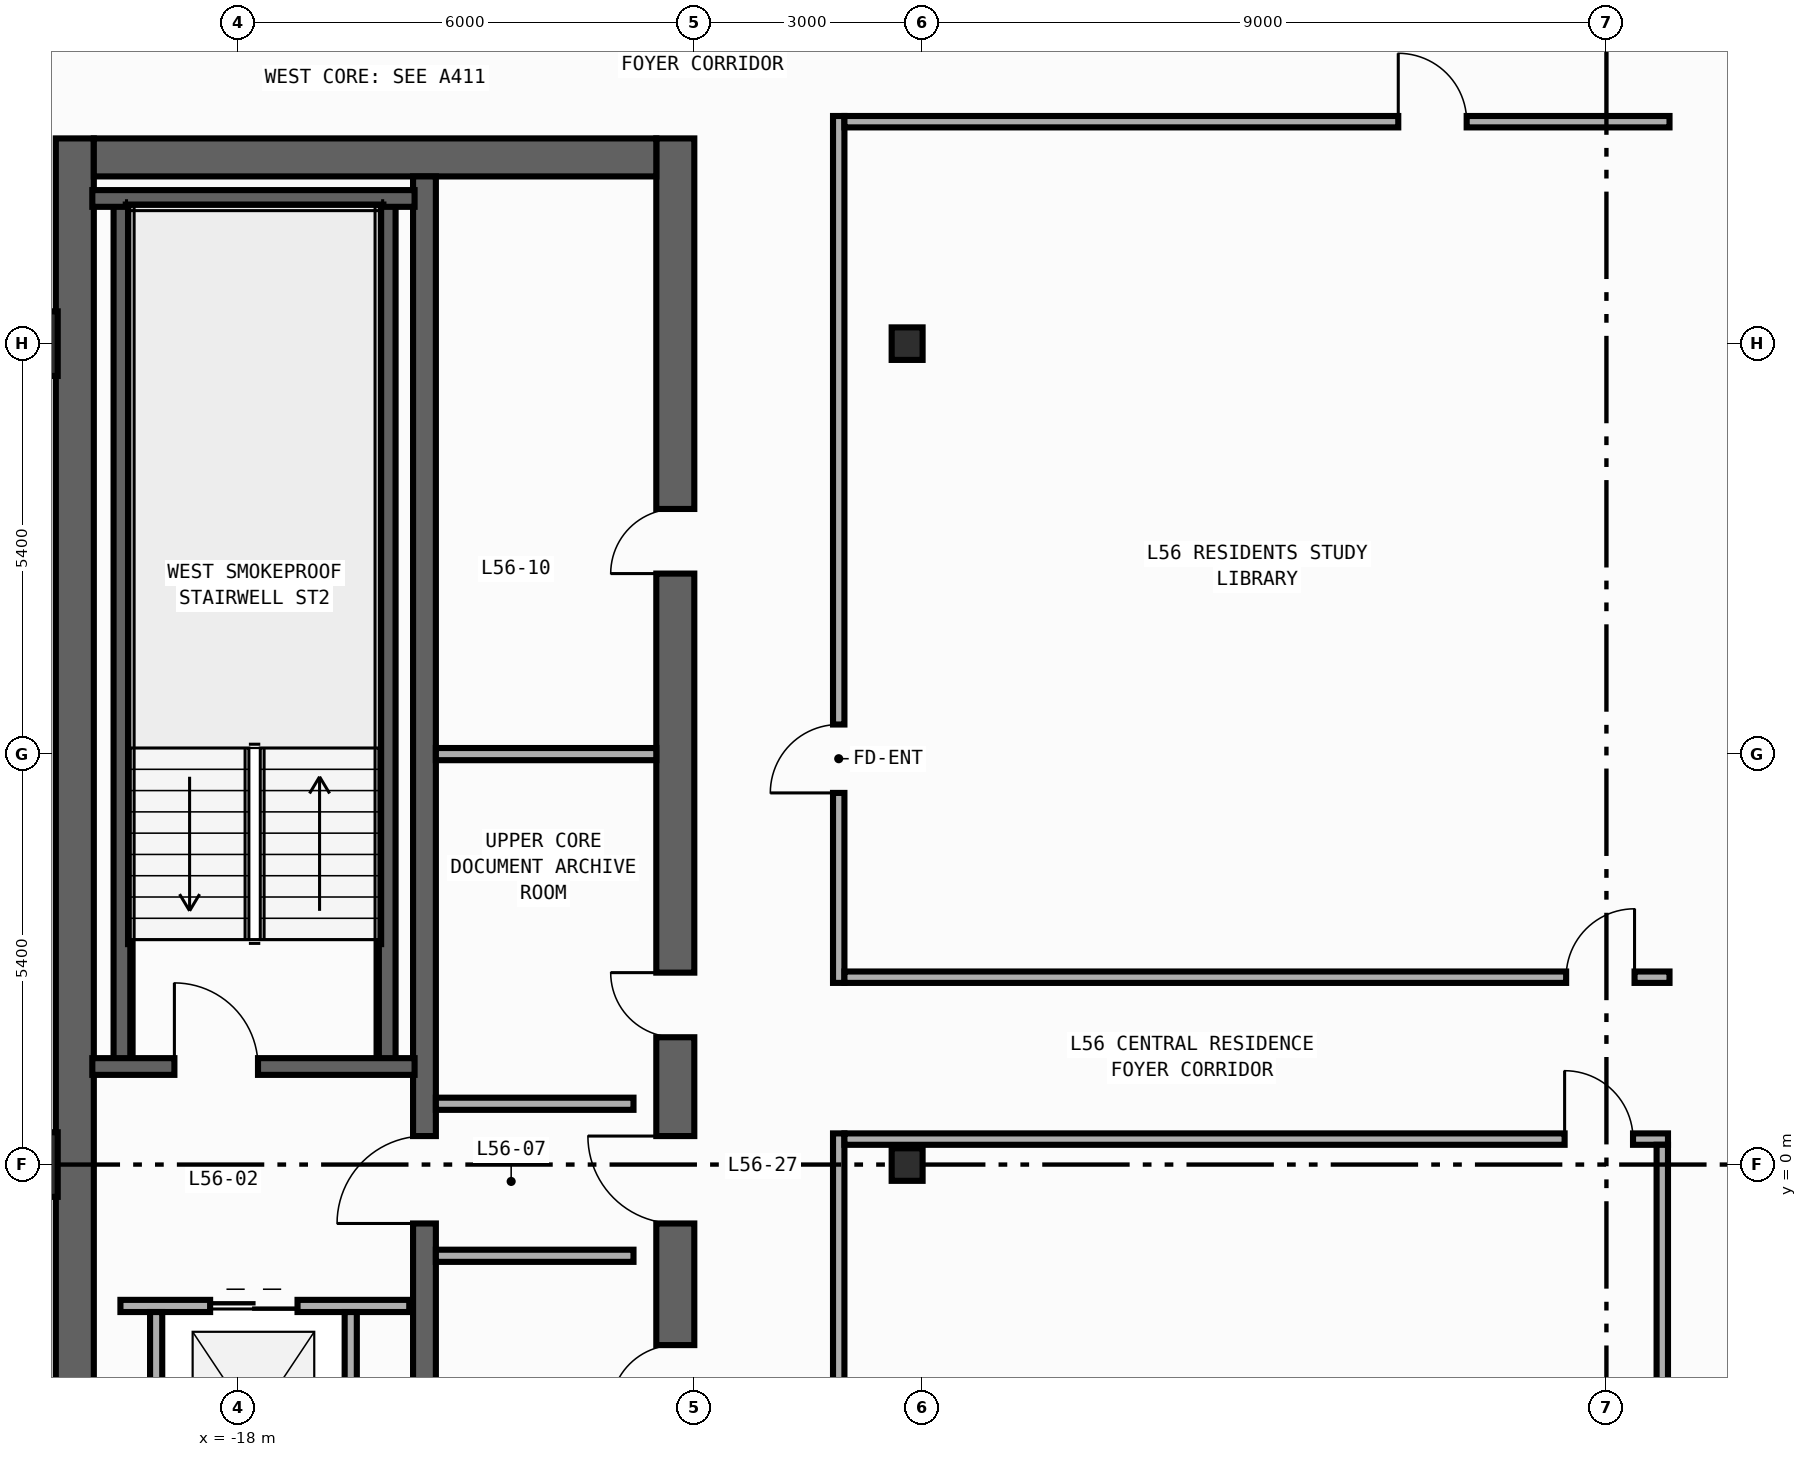
"""IFC4 building model, lengths in metres.
Left out: names, types, materials, properties, quantities, classifications, styles, units other than length and angle.
Written with IfcOpenShell. Run it as: python <this file> out.ifc"""

import sys

from ifc_helpers import new_model, si_unit, direction, frame, frame_2d, origin, origin_2d, place, context, subcontext, project, spatial, rectangle, i_section, extrude, element, fill, save


model = new_model("IFC4")
c1 = context("Model", 3, precision=1e-05, world=origin(), true_north=direction((0.0, 1.0)))
c2 = subcontext(c1, "Body", "Model", "MODEL_VIEW")
j1 = project(units=[si_unit("LENGTHUNIT", "METRE"), si_unit("PLANEANGLEUNIT", "RADIAN")], contexts=[c1])
p1 = place(None, origin())
s1 = spatial("IfcSite", under=j1, at=p1, CompositionType="ELEMENT")
p2 = place(p1, origin())
s2 = spatial("IfcBuilding", under=s1, at=p2, CompositionType="ELEMENT")
p3 = place(p2, frame((0.0, 0.0, 240.4)))
s3 = spatial("IfcBuildingStorey", under=s2, at=p3, CompositionType="ELEMENT", Elevation=240.4)
p4 = place(p3, frame((-20.15, -13.5, 0.0), z_axis=(0.0, 0.0, 1.0), x_axis=(0.0, 1.0, 0.0)))
e1 = element("IfcWall", 1, at=p4, inside=s3, PredefinedType="SHEAR", context=c2, shape_type="SweptSolid", body=[
    extrude(rectangle(XDim=27.0, YDim=0.5, at=frame_2d((13.5, 0.0))), origin(), (0.0, 0.0, 1.0), 3.34),
])
p5 = place(p3, frame((-12.25, -13.5, 0.0), z_axis=(0.0, 0.0, 1.0), x_axis=(0.0, 1.0, 0.0)))
e2 = element("IfcWall", 2, at=p5, inside=s3, PredefinedType="SHEAR", context=c2, shape_type="SweptSolid", body=[
    extrude(rectangle(XDim=27.0, YDim=0.5, at=frame_2d((13.5, 0.0))), origin(), (0.0, 0.0, 1.0), 3.34),
])
p6 = place(p5, frame((15.175, 0.0, 0.0)))
e3 = element("IfcOpeningElement", 3, at=p6, cuts=e2, PredefinedType="OPENING", context=c2, shape_type="SweptSolid", body=[
    extrude(rectangle(XDim=0.85, YDim=2.1, at=frame_2d((0.425, 1.05))), frame((0.0, 0.26, 0.0), z_axis=(0.0, -1.0, 0.0), x_axis=(1.0, 0.0, 0.0)), (0.0, 0.0, 1.0), 0.52),
])
p7 = place(p5, frame((21.275, 0.0, 0.0)))
e4 = element("IfcOpeningElement", 4, at=p7, cuts=e2, PredefinedType="OPENING", context=c2, shape_type="SweptSolid", body=[
    extrude(rectangle(XDim=0.85, YDim=2.1, at=frame_2d((0.425, 1.05))), frame((0.0, 0.26, 0.0), z_axis=(0.0, -1.0, 0.0), x_axis=(1.0, 0.0, 0.0)), (0.0, 0.0, 1.0), 0.52),
])
p8 = place(p5, frame((4.275, 0.0, 0.0)))
e5 = element("IfcOpeningElement", 5, at=p8, cuts=e2, PredefinedType="OPENING", context=c2, shape_type="SweptSolid", body=[
    extrude(rectangle(XDim=0.85, YDim=2.1, at=frame_2d((0.425, 1.05))), frame((0.0, 0.26, 0.0), z_axis=(0.0, -1.0, 0.0), x_axis=(1.0, 0.0, 0.0)), (0.0, 0.0, 1.0), 0.52),
])
p9 = place(p5, frame((10.275, 0.0, 0.0)))
e6 = element("IfcOpeningElement", 6, at=p9, cuts=e2, PredefinedType="OPENING", context=c2, shape_type="SweptSolid", body=[
    extrude(rectangle(XDim=0.85, YDim=2.1, at=frame_2d((0.425, 1.05))), frame((0.0, 0.26, 0.0), z_axis=(0.0, -1.0, 0.0), x_axis=(1.0, 0.0, 0.0)), (0.0, 0.0, 1.0), 0.52),
])
p10 = place(p5, frame((12.725, 0.0, 0.0)))
e7 = element("IfcOpeningElement", 7, at=p10, cuts=e2, PredefinedType="OPENING", context=c2, shape_type="SweptSolid", body=[
    extrude(rectangle(XDim=1.15, YDim=2.2, at=frame_2d((0.575, 1.1))), frame((0.0, 0.26, 0.0), z_axis=(0.0, -1.0, 0.0), x_axis=(1.0, 0.0, 0.0)), (0.0, 0.0, 1.0), 0.52),
])
p11 = place(p5, frame((1.625, 0.0, 0.0)))
e8 = element("IfcOpeningElement", 8, at=p11, cuts=e2, PredefinedType="OPENING", context=c2, shape_type="SweptSolid", body=[
    extrude(rectangle(XDim=0.85, YDim=2.1, at=frame_2d((0.425, 1.05))), frame((0.0, 0.26, 0.0), z_axis=(0.0, -1.0, 0.0), x_axis=(1.0, 0.0, 0.0)), (0.0, 0.0, 1.0), 0.52),
])
p12 = place(p3, frame((-19.9, 13.25, 0.0), z_axis=(0.0, 0.0, 1.0), x_axis=(1.0, 0.0, 0.0)))
e9 = element("IfcWall", 9, at=p12, inside=s3, PredefinedType="SHEAR", context=c2, shape_type="SweptSolid", body=[
    extrude(rectangle(XDim=7.4, YDim=0.5, at=frame_2d((3.7, 0.0))), origin(), (0.0, 0.0, 1.0), 3.34),
])
p13 = place(p3, frame((-15.55, -13.0, 0.0), z_axis=(0.0, 0.0, 1.0), x_axis=(0.0, 1.0, 0.0)))
e10 = element("IfcWall", 10, at=p13, inside=s3, PredefinedType="SHEAR", context=c2, shape_type="SweptSolid", body=[
    extrude(rectangle(XDim=26.0, YDim=0.3, at=frame_2d((13.0, 0.0))), origin(), (0.0, 0.0, 1.0), 3.34),
])
p14 = place(p13, frame((12.225, 0.0, 0.0)))
e11 = element("IfcOpeningElement", 11, at=p14, cuts=e10, PredefinedType="OPENING", context=c2, shape_type="SweptSolid", body=[
    extrude(rectangle(XDim=1.15, YDim=2.2, at=frame_2d((0.575, 1.1))), frame((0.0, 0.16, 0.0), z_axis=(0.0, -1.0, 0.0), x_axis=(1.0, 0.0, 0.0)), (0.0, 0.0, 1.0), 0.32),
])
p15 = place(p13, frame((1.125, 0.0, 0.0)))
e12 = element("IfcOpeningElement", 12, at=p15, cuts=e10, PredefinedType="OPENING", context=c2, shape_type="SweptSolid", body=[
    extrude(rectangle(XDim=0.85, YDim=2.1, at=frame_2d((0.425, 1.05))), frame((0.0, 0.16, 0.0), z_axis=(0.0, -1.0, 0.0), x_axis=(1.0, 0.0, 0.0)), (0.0, 0.0, 1.0), 0.32),
])
for number, where, z_axis, x_axis in (
    (13, (-16.04, 1.29, 0.0), (0.0, 0.0, 1.0), (0.0, 1.0, 0.0)),
    (14, (-19.53, 1.29, 0.0), (0.0, 0.0, 1.0), (0.0, 1.0, 0.0)),
):
    element("IfcWall", number, at=place(p3, frame(where, z_axis=z_axis, x_axis=x_axis)), inside=s3, PredefinedType="SHEAR", context=c2, shape_type="SweptSolid", body=[
        extrude(rectangle(XDim=11.42, YDim=0.22, at=frame_2d((5.71, 0.0))), origin(), (0.0, 0.0, 1.0), 3.34),
    ])
p16 = place(p3, frame((-19.92, 12.71, 0.0), z_axis=(0.0, 0.0, 1.0), x_axis=(1.0, 0.0, 0.0)))
e15 = element("IfcWall", 15, at=p16, inside=s3, PredefinedType="SHEAR", context=c2, shape_type="SweptSolid", body=[
    extrude(rectangle(XDim=4.24, YDim=0.22, at=frame_2d((2.12, 0.0))), origin(), (0.0, 0.0, 1.0), 3.34),
])
p17 = place(p3, frame((-19.92, 1.29, 0.0), z_axis=(0.0, 0.0, 1.0), x_axis=(1.0, 0.0, 0.0)))
e16 = element("IfcWall", 16, at=p17, inside=s3, PredefinedType="SHEAR", context=c2, shape_type="SweptSolid", body=[
    extrude(rectangle(XDim=4.24, YDim=0.22, at=frame_2d((2.12, 0.0))), origin(), (0.0, 0.0, 1.0), 3.34),
])
p18 = place(p17, frame((1.08, 0.0, 0.0)))
e17 = element("IfcOpeningElement", 17, at=p18, cuts=e16, PredefinedType="OPENING", context=c2, shape_type="SweptSolid", body=[
    extrude(rectangle(XDim=1.1, YDim=2.2, at=frame_2d((0.55, 1.1))), frame((0.0, 0.12, 0.0), z_axis=(0.0, -1.0, 0.0), x_axis=(1.0, 0.0, 0.0)), (0.0, 0.0, 1.0), 0.24),
])
for number, where, z_axis, x_axis in (
    (18, (-9.2, 0.0, 0.0), (0.0, 0.0, 1.0), (1.0, 0.0, 0.0)),
    (19, (-9.2, 10.8, 0.0), (0.0, 0.0, 1.0), (1.0, 0.0, 0.0)),
):
    element("IfcColumn", number, at=place(p3, frame(where, z_axis=z_axis, x_axis=x_axis)), inside=s3, PredefinedType="COLUMN", context=c2, shape_type="SweptSolid", body=[
        extrude(i_section(OverallWidth=0.407, OverallDepth=0.428, WebThickness=0.02, FlangeThickness=0.035, FilletRadius=0.022, at=origin_2d()), origin(), (0.0, 0.0, 1.0), 3.6),
    ])
for number, where, z_axis, x_axis in (
    (20, (-20.8, 0.0, 0.0), (0.0, 0.0, 1.0), (1.0, 0.0, 0.0)),
    (21, (-20.8, 10.8, 0.0), (0.0, 0.0, 1.0), (1.0, 0.0, 0.0)),
):
    element("IfcColumn", number, at=place(p3, frame(where, z_axis=z_axis, x_axis=x_axis)), inside=s3, PredefinedType="COLUMN", context=c2, shape_type="SweptSolid", body=[
        extrude(rectangle(XDim=0.85, YDim=0.85, at=origin_2d()), origin(), (0.0, 0.0, 1.0), 3.6),
    ])
p19 = place(p3, frame((-19.55, -1.86, 0.0), z_axis=(0.0, 0.0, 1.0), x_axis=(1.0, 0.0, 0.0)))
e22 = element("IfcWall", 22, at=p19, inside=s3, PredefinedType="STANDARD", context=c2, shape_type="SweptSolid", body=[
    extrude(rectangle(XDim=3.8, YDim=0.16, at=frame_2d((1.9, 0.0))), origin(), (0.0, 0.0, 1.0), 3.34),
])
p20 = place(p19, frame((1.18, 0.0, 0.0)))
e23 = element("IfcOpeningElement", 23, at=p20, cuts=e22, PredefinedType="OPENING", context=c2, shape_type="SweptSolid", body=[
    extrude(rectangle(XDim=1.15, YDim=2.2, at=frame_2d((0.575, 1.1))), frame((0.0, 0.09, 0.0), z_axis=(0.0, -1.0, 0.0), x_axis=(1.0, 0.0, 0.0)), (0.0, 0.0, 1.0), 0.18),
])
for number, where, z_axis, x_axis in (
    (24, (-19.08, -4.9, 0.0), (0.0, 0.0, 1.0), (0.0, 1.0, 0.0)),
    (25, (-16.52, -4.9, 0.0), (0.0, 0.0, 1.0), (0.0, 1.0, 0.0)),
):
    element("IfcWall", number, at=place(p3, frame(where, z_axis=z_axis, x_axis=x_axis)), inside=s3, PredefinedType="STANDARD", context=c2, shape_type="SweptSolid", body=[
        extrude(rectangle(XDim=2.96, YDim=0.16, at=frame_2d((1.48, 0.0))), origin(), (0.0, 0.0, 1.0), 3.34),
    ])
for number, where, z_axis, x_axis in (
    (26, (-15.4, 0.8, 0.0), (0.0, 0.0, 1.0), (1.0, 0.0, 0.0)),
    (27, (-15.4, -1.2, 0.0), (0.0, 0.0, 1.0), (1.0, 0.0, 0.0)),
):
    element("IfcWall", number, at=place(p3, frame(where, z_axis=z_axis, x_axis=x_axis)), inside=s3, PredefinedType="STANDARD", context=c2, shape_type="SweptSolid", body=[
        extrude(rectangle(XDim=2.6, YDim=0.16, at=frame_2d((1.3, 0.0))), origin(), (0.0, 0.0, 1.0), 3.34),
    ])
p21 = place(p3, frame((-15.4, 5.4, 0.0), z_axis=(0.0, 0.0, 1.0), x_axis=(1.0, 0.0, 0.0)))
e28 = element("IfcWall", 28, at=p21, inside=s3, PredefinedType="PARTITIONING", context=c2, shape_type="SweptSolid", body=[
    extrude(rectangle(XDim=2.9, YDim=0.16, at=frame_2d((1.45, 0.0))), origin(), (0.0, 0.0, 1.0), 3.34),
])
p22 = place(p3, frame((-10.1, 2.39, 0.0), z_axis=(0.0, 0.0, 1.0), x_axis=(0.0, 1.0, 0.0)))
e29 = element("IfcWall", 29, at=p22, inside=s3, PredefinedType="PARTITIONING", context=c2, shape_type="SweptSolid", body=[
    extrude(rectangle(XDim=11.405, YDim=0.15, at=frame_2d((5.703, 0.0))), origin(), (0.0, 0.0, 1.0), 3.34),
])
p23 = place(p22, frame((2.5, 0.0, 0.0)))
e30 = element("IfcOpeningElement", 30, at=p23, cuts=e29, PredefinedType="OPENING", context=c2, shape_type="SweptSolid", body=[
    extrude(rectangle(XDim=0.9, YDim=2.15, at=frame_2d((0.45, 1.075))), frame((0.0, 0.085, 0.0), z_axis=(0.0, -1.0, 0.0), x_axis=(1.0, 0.0, 0.0)), (0.0, 0.0, 1.0), 0.17),
])
p24 = place(p3, frame((-10.1, -13.795, 0.0), z_axis=(0.0, 0.0, 1.0), x_axis=(0.0, 1.0, 0.0)))
e31 = element("IfcWall", 31, at=p24, inside=s3, PredefinedType="PARTITIONING", context=c2, shape_type="SweptSolid", body=[
    extrude(rectangle(XDim=14.205, YDim=0.15, at=frame_2d((7.103, 0.0))), origin(), (0.0, 0.0, 1.0), 3.34),
])
p25 = place(p24, frame((7.972, 0.0, 0.0)))
e32 = element("IfcOpeningElement", 32, at=p25, cuts=e31, PredefinedType="OPENING", context=c2, shape_type="SweptSolid", body=[
    extrude(rectangle(XDim=0.9, YDim=2.15, at=frame_2d((0.45, 1.075))), frame((0.0, 0.085, 0.0), z_axis=(0.0, -1.0, 0.0), x_axis=(1.0, 0.0, 0.0)), (0.0, 0.0, 1.0), 0.17),
])
p26 = place(p3, frame((-10.025, 2.465, 0.0), z_axis=(0.0, 0.0, 1.0), x_axis=(1.0, 0.0, 0.0)))
e33 = element("IfcWall", 33, at=p26, inside=s3, PredefinedType="PARTITIONING", context=c2, shape_type="SweptSolid", body=[
    extrude(rectangle(XDim=10.855, YDim=0.15, at=frame_2d((5.427, 0.0))), origin(), (0.0, 0.0, 1.0), 3.34),
])
p27 = place(p26, frame((9.495, 0.0, 0.0)))
e34 = element("IfcOpeningElement", 34, at=p27, cuts=e33, PredefinedType="OPENING", context=c2, shape_type="SweptSolid", body=[
    extrude(rectangle(XDim=0.9, YDim=2.15, at=frame_2d((0.45, 1.075))), frame((0.0, 0.085, 0.0), z_axis=(0.0, -1.0, 0.0), x_axis=(1.0, 0.0, 0.0)), (0.0, 0.0, 1.0), 0.17),
])
p28 = place(p3, frame((-10.025, 0.335, 0.0), z_axis=(0.0, 0.0, 1.0), x_axis=(1.0, 0.0, 0.0)))
e35 = element("IfcWall", 35, at=p28, inside=s3, PredefinedType="PARTITIONING", context=c2, shape_type="SweptSolid", body=[
    extrude(rectangle(XDim=10.835, YDim=0.15, at=frame_2d((5.417, 0.0))), origin(), (0.0, 0.0, 1.0), 2.44),
])
p29 = place(p28, frame((9.475, 0.0, 0.0)))
e36 = element("IfcOpeningElement", 36, at=p29, cuts=e35, PredefinedType="OPENING", context=c2, shape_type="SweptSolid", body=[
    extrude(rectangle(XDim=0.9, YDim=2.15, at=frame_2d((0.45, 1.075))), frame((0.0, 0.085, 0.0), z_axis=(0.0, -1.0, 0.0), x_axis=(1.0, 0.0, 0.0)), (0.0, 0.0, 1.0), 0.17),
])
p30 = place(p3, frame((0.735, -13.795, 0.0), z_axis=(0.0, 0.0, 1.0), x_axis=(0.0, 1.0, 0.0)))
e37 = element("IfcWall", 37, at=p30, inside=s3, PredefinedType="PARTITIONING", context=c2, shape_type="SweptSolid", body=[
    extrude(rectangle(XDim=14.055, YDim=0.15, at=frame_2d((7.027, 0.0))), origin(), (0.0, 0.0, 1.0), 3.34),
])
p31 = place(p30, frame((7.881, 0.0, 0.0)))
e38 = element("IfcOpeningElement", 38, at=p31, cuts=e37, PredefinedType="OPENING", context=c2, shape_type="SweptSolid", body=[
    extrude(rectangle(XDim=0.9, YDim=2.15, at=frame_2d((0.45, 1.075))), frame((0.0, 0.085, 0.0), z_axis=(0.0, -1.0, 0.0), x_axis=(1.0, 0.0, 0.0)), (0.0, 0.0, 1.0), 0.17),
])
p32 = place(p3, frame((-10.025, 13.72, 0.0), z_axis=(0.0, 0.0, 1.0), x_axis=(1.0, 0.0, 0.0)))
e39 = element("IfcWall", 39, at=p32, inside=s3, PredefinedType="PARTITIONING", context=c2, shape_type="SweptSolid", body=[
    extrude(rectangle(XDim=10.855, YDim=0.15, at=frame_2d((5.427, 0.0))), origin(), (0.0, 0.0, 1.0), 3.34),
])
p33 = place(p32, frame((7.286, 0.0, 0.0)))
e40 = element("IfcOpeningElement", 40, at=p33, cuts=e39, PredefinedType="OPENING", context=c2, shape_type="SweptSolid", body=[
    extrude(rectangle(XDim=0.9, YDim=2.15, at=frame_2d((0.45, 1.075))), frame((0.0, 0.085, 0.0), z_axis=(0.0, -1.0, 0.0), x_axis=(1.0, 0.0, 0.0)), (0.0, 0.0, 1.0), 0.17),
])
p34 = place(p18, origin())
e41 = element("IfcDoor", 41, at=p34, inside=s3, OperationType="SINGLE_SWING_LEFT", PredefinedType="DOOR", context=c2, shape_type="SweptSolid", body=[
    extrude(rectangle(XDim=1.1, YDim=2.2, at=frame_2d((0.55, 1.1))), frame((0.0, 0.025, 0.0), z_axis=(0.0, -1.0, 0.0), x_axis=(1.0, 0.0, 0.0)), (0.0, 0.0, 1.0), 0.05),
])
fill(e17, e41)
p35 = place(p6, origin())
e42 = element("IfcDoor", 42, at=p35, inside=s3, OperationType="SINGLE_SWING_RIGHT", PredefinedType="DOOR", context=c2, shape_type="SweptSolid", body=[
    extrude(rectangle(XDim=0.85, YDim=2.1, at=frame_2d((0.425, 1.05))), frame((0.0, 0.025, 0.0), z_axis=(0.0, -1.0, 0.0), x_axis=(1.0, 0.0, 0.0)), (0.0, 0.0, 1.0), 0.05),
])
fill(e3, e42)
p36 = place(p7, origin())
e43 = element("IfcDoor", 43, at=p36, inside=s3, OperationType="SINGLE_SWING_LEFT", PredefinedType="DOOR", context=c2, shape_type="SweptSolid", body=[
    extrude(rectangle(XDim=0.85, YDim=2.1, at=frame_2d((0.425, 1.05))), frame((0.0, 0.025, 0.0), z_axis=(0.0, -1.0, 0.0), x_axis=(1.0, 0.0, 0.0)), (0.0, 0.0, 1.0), 0.05),
])
fill(e4, e43)
p37 = place(p9, origin())
e44 = element("IfcDoor", 44, at=p37, inside=s3, OperationType="SINGLE_SWING_LEFT", PredefinedType="DOOR", context=c2, shape_type="SweptSolid", body=[
    extrude(rectangle(XDim=0.85, YDim=2.1, at=frame_2d((0.425, 1.05))), frame((0.0, 0.025, 0.0), z_axis=(0.0, -1.0, 0.0), x_axis=(1.0, 0.0, 0.0)), (0.0, 0.0, 1.0), 0.05),
])
fill(e6, e44)
p38 = place(p10, origin())
e45 = element("IfcDoor", 45, at=p38, inside=s3, OperationType="SINGLE_SWING_RIGHT", PredefinedType="DOOR", context=c2, shape_type="SweptSolid", body=[
    extrude(rectangle(XDim=1.15, YDim=2.2, at=frame_2d((0.575, 1.1))), frame((0.0, 0.025, 0.0), z_axis=(0.0, -1.0, 0.0), x_axis=(1.0, 0.0, 0.0)), (0.0, 0.0, 1.0), 0.05),
])
fill(e7, e45)
p39 = place(p14, origin())
e46 = element("IfcDoor", 46, at=p39, inside=s3, OperationType="SINGLE_SWING_LEFT", PredefinedType="DOOR", context=c2, shape_type="SweptSolid", body=[
    extrude(rectangle(XDim=1.15, YDim=2.2, at=frame_2d((0.575, 1.1))), frame((0.0, 0.025, 0.0), z_axis=(0.0, -1.0, 0.0), x_axis=(1.0, 0.0, 0.0)), (0.0, 0.0, 1.0), 0.05),
])
fill(e11, e46)
p40 = place(p20, origin())
e47 = element("IfcDoor", 47, at=p40, inside=s3, OperationType="DOUBLE_DOOR_SLIDING", PredefinedType="DOOR", context=c2, shape_type="SweptSolid", body=[
    extrude(rectangle(XDim=1.15, YDim=2.2, at=frame_2d((0.575, 1.1))), frame((0.0, 0.025, 0.0), z_axis=(0.0, -1.0, 0.0), x_axis=(1.0, 0.0, 0.0)), (0.0, 0.0, 1.0), 0.05),
])
fill(e23, e47)
p41 = place(p23, origin())
e48 = element("IfcDoor", 48, at=p41, inside=s3, OperationType="SINGLE_SWING_LEFT", PredefinedType="DOOR", context=c2, shape_type="SweptSolid", body=[
    extrude(rectangle(XDim=0.9, YDim=2.15, at=frame_2d((0.45, 1.075))), frame((0.0, 0.025, 0.0), z_axis=(0.0, -1.0, 0.0), x_axis=(1.0, 0.0, 0.0)), (0.0, 0.0, 1.0), 0.05),
])
fill(e30, e48)
p42 = place(p27, origin())
e49 = element("IfcDoor", 49, at=p42, inside=s3, OperationType="SINGLE_SWING_RIGHT", PredefinedType="DOOR", context=c2, shape_type="SweptSolid", body=[
    extrude(rectangle(XDim=0.9, YDim=2.15, at=frame_2d((0.45, 1.075))), frame((0.0, 0.025, 0.0), z_axis=(0.0, -1.0, 0.0), x_axis=(1.0, 0.0, 0.0)), (0.0, 0.0, 1.0), 0.05),
])
fill(e34, e49)
p43 = place(p29, origin())
e50 = element("IfcDoor", 50, at=p43, inside=s3, OperationType="SINGLE_SWING_LEFT", PredefinedType="DOOR", context=c2, shape_type="SweptSolid", body=[
    extrude(rectangle(XDim=0.9, YDim=2.15, at=frame_2d((0.45, 1.075))), frame((0.0, 0.025, 0.0), z_axis=(0.0, -1.0, 0.0), x_axis=(1.0, 0.0, 0.0)), (0.0, 0.0, 1.0), 0.05),
])
fill(e36, e50)
p44 = place(p33, origin())
e51 = element("IfcDoor", 51, at=p44, inside=s3, OperationType="SINGLE_SWING_LEFT", PredefinedType="DOOR", context=c2, shape_type="SweptSolid", body=[
    extrude(rectangle(XDim=0.9, YDim=2.15, at=frame_2d((0.45, 1.075))), frame((0.0, 0.025, 0.0), z_axis=(0.0, -1.0, 0.0), x_axis=(1.0, 0.0, 0.0)), (0.0, 0.0, 1.0), 0.05),
])
fill(e40, e51)
save(model, sys.argv[1])
